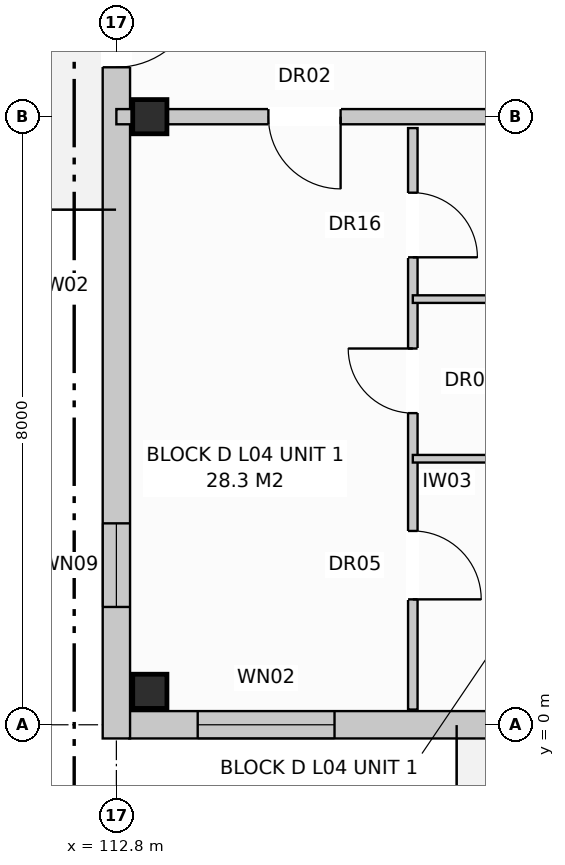
"""IFC4 building model, lengths in metres.
Left out: names, types, materials, properties, quantities, classifications, styles, units other than length and angle.
Written with IfcOpenShell. Run it as: python <this file> out.ifc"""

import sys

from ifc_helpers import new_model, si_unit, direction, frame, frame_2d, origin, origin_with_axes, origin_2d, place, context, subcontext, project, spatial, rectangle, extrude, element, fill, save


model = new_model("IFC4")
c1 = context("Model", 3, precision=1e-05, world=origin(), true_north=direction((0.0, 1.0)))
c2 = subcontext(c1, "Body", "Model", "MODEL_VIEW")
j1 = project(units=[si_unit("LENGTHUNIT", "METRE"), si_unit("PLANEANGLEUNIT", "RADIAN")], contexts=[c1])
p1 = place(None, origin())
s1 = spatial("IfcSite", under=j1, at=p1, CompositionType="ELEMENT")
p2 = place(p1, origin())
s2 = spatial("IfcBuilding", under=s1, at=p2, CompositionType="ELEMENT")
p3 = place(p2, frame((0.0, 0.0, 14.4)))
s3 = spatial("IfcBuildingStorey", under=s2, at=p3, CompositionType="ELEMENT", Elevation=14.4)
for number, where, z_axis, x_axis in (
    (1, (113.24, 0.44, 0.0), (0.0, 0.0, 1.0), (1.0, 0.0, 0.0)),
    (2, (113.24, 8.0, 0.0), (0.0, 0.0, 1.0), (1.0, 0.0, 0.0)),
):
    element("IfcColumn", number, at=place(p3, frame(where, z_axis=z_axis, x_axis=x_axis)), inside=s3, PredefinedType="COLUMN", context=c2, shape_type="SweptSolid", body=[
        extrude(rectangle(XDim=0.45, YDim=0.45, at=origin_2d()), origin(), (0.0, 0.0, 1.0), 3.2),
    ])
p4 = place(p3, frame((112.97, 0.0, 0.0), z_axis=(0.0, 0.0, 1.0), x_axis=(1.0, 0.0, 0.0)))
e3 = element("IfcWall", 3, at=p4, inside=s3, PredefinedType="STANDARD", context=c2, shape_type="SweptSolid", body=[
    extrude(rectangle(XDim=54.86, YDim=0.36, at=frame_2d((27.43, 0.0))), origin(), (0.0, 0.0, 1.0), 2.94),
])
p5 = place(p4, frame((5.127, 0.0, 0.0)))
e4 = element("IfcOpeningElement", 4, at=p5, cuts=e3, PredefinedType="OPENING", context=c2, shape_type="SweptSolid", body=[
    extrude(rectangle(XDim=0.95, YDim=2.1, at=frame_2d((0.475, 1.05))), frame((0.0, 0.192, 0.0), z_axis=(0.0, -1.0, 0.0), x_axis=(1.0, 0.0, 0.0)), (0.0, 0.0, 1.0), 0.384),
])
p6 = place(p4, frame((18.9, 0.0, 0.0)))
e5 = element("IfcOpeningElement", 5, at=p6, cuts=e3, PredefinedType="OPENING", context=c2, shape_type="SweptSolid", body=[
    extrude(rectangle(XDim=0.95, YDim=2.1, at=frame_2d((0.475, 1.05))), frame((0.0, 0.192, 0.0), z_axis=(0.0, -1.0, 0.0), x_axis=(1.0, 0.0, 0.0)), (0.0, 0.0, 1.0), 0.384),
])
p7 = place(p4, frame((32.7, 0.0, 0.0)))
e6 = element("IfcOpeningElement", 6, at=p7, cuts=e3, PredefinedType="OPENING", context=c2, shape_type="SweptSolid", body=[
    extrude(rectangle(XDim=0.95, YDim=2.1, at=frame_2d((0.475, 1.05))), frame((0.0, 0.192, 0.0), z_axis=(0.0, -1.0, 0.0), x_axis=(1.0, 0.0, 0.0)), (0.0, 0.0, 1.0), 0.384),
])
p8 = place(p4, frame((44.591, 0.0, 0.0)))
e7 = element("IfcOpeningElement", 7, at=p8, cuts=e3, PredefinedType="OPENING", context=c2, shape_type="SweptSolid", body=[
    extrude(rectangle(XDim=0.95, YDim=2.1, at=frame_2d((0.475, 1.05))), frame((0.0, 0.192, 0.0), z_axis=(0.0, -1.0, 0.0), x_axis=(1.0, 0.0, 0.0)), (0.0, 0.0, 1.0), 0.384),
])
p9 = place(p4, frame((0.9, 0.0, 0.8)))
e8 = element("IfcOpeningElement", 8, at=p9, cuts=e3, PredefinedType="OPENING", context=c2, shape_type="SweptSolid", body=[
    extrude(rectangle(XDim=1.8, YDim=1.7, at=frame_2d((0.9, 0.85))), frame((0.0, 0.192, 0.0), z_axis=(0.0, -1.0, 0.0), x_axis=(1.0, 0.0, 0.0)), (0.0, 0.0, 1.0), 0.384),
])
p10 = place(p4, frame((8.35, 0.0, 0.72)))
e9 = element("IfcOpeningElement", 9, at=p10, cuts=e3, PredefinedType="OPENING", context=c2, shape_type="SweptSolid", body=[
    extrude(rectangle(XDim=1.1, YDim=1.5, at=frame_2d((0.55, 0.75))), frame((0.0, 0.192, 0.0), z_axis=(0.0, -1.0, 0.0), x_axis=(1.0, 0.0, 0.0)), (0.0, 0.0, 1.0), 0.384),
])
p11 = place(p4, frame((11.225, 0.0, 0.8)))
e10 = element("IfcOpeningElement", 10, at=p11, cuts=e3, PredefinedType="OPENING", context=c2, shape_type="SweptSolid", body=[
    extrude(rectangle(XDim=1.95, YDim=1.65, at=frame_2d((0.975, 0.825))), frame((0.0, 0.192, 0.0), z_axis=(0.0, -1.0, 0.0), x_axis=(1.0, 0.0, 0.0)), (0.0, 0.0, 1.0), 0.384),
])
p12 = place(p4, frame((16.8, 0.0, 0.8)))
e11 = element("IfcOpeningElement", 11, at=p12, cuts=e3, PredefinedType="OPENING", context=c2, shape_type="SweptSolid", body=[
    extrude(rectangle(XDim=1.8, YDim=1.7, at=frame_2d((0.9, 0.85))), frame((0.0, 0.192, 0.0), z_axis=(0.0, -1.0, 0.0), x_axis=(1.0, 0.0, 0.0)), (0.0, 0.0, 1.0), 0.384),
])
p13 = place(p4, frame((22.25, 0.0, 0.72)))
e12 = element("IfcOpeningElement", 12, at=p13, cuts=e3, PredefinedType="OPENING", context=c2, shape_type="SweptSolid", body=[
    extrude(rectangle(XDim=1.9, YDim=1.85, at=frame_2d((0.95, 0.925))), frame((0.0, 0.192, 0.0), z_axis=(0.0, -1.0, 0.0), x_axis=(1.0, 0.0, 0.0)), (0.0, 0.0, 1.0), 0.384),
])
p14 = place(p4, frame((28.35, 0.0, 0.72)))
e13 = element("IfcOpeningElement", 13, at=p14, cuts=e3, PredefinedType="OPENING", context=c2, shape_type="SweptSolid", body=[
    extrude(rectangle(XDim=1.1, YDim=1.5, at=frame_2d((0.55, 0.75))), frame((0.0, 0.192, 0.0), z_axis=(0.0, -1.0, 0.0), x_axis=(1.0, 0.0, 0.0)), (0.0, 0.0, 1.0), 0.384),
])
p15 = place(p4, frame((30.6, 0.0, 0.8)))
e14 = element("IfcOpeningElement", 14, at=p15, cuts=e3, PredefinedType="OPENING", context=c2, shape_type="SweptSolid", body=[
    extrude(rectangle(XDim=1.8, YDim=1.7, at=frame_2d((0.9, 0.85))), frame((0.0, 0.192, 0.0), z_axis=(0.0, -1.0, 0.0), x_axis=(1.0, 0.0, 0.0)), (0.0, 0.0, 1.0), 0.384),
])
p16 = place(p4, frame((36.55, 0.0, 0.8)))
e15 = element("IfcOpeningElement", 15, at=p16, cuts=e3, PredefinedType="OPENING", context=c2, shape_type="SweptSolid", body=[
    extrude(rectangle(XDim=1.9, YDim=1.85, at=frame_2d((0.95, 0.925))), frame((0.0, 0.192, 0.0), z_axis=(0.0, -1.0, 0.0), x_axis=(1.0, 0.0, 0.0)), (0.0, 0.0, 1.0), 0.384),
])
p17 = place(p4, frame((42.65, 0.0, 0.72)))
e16 = element("IfcOpeningElement", 16, at=p17, cuts=e3, PredefinedType="OPENING", context=c2, shape_type="SweptSolid", body=[
    extrude(rectangle(XDim=1.1, YDim=1.5, at=frame_2d((0.55, 0.75))), frame((0.0, 0.192, 0.0), z_axis=(0.0, -1.0, 0.0), x_axis=(1.0, 0.0, 0.0)), (0.0, 0.0, 1.0), 0.384),
])
p18 = place(p4, frame((48.7, 0.0, 0.8)))
e17 = element("IfcOpeningElement", 17, at=p18, cuts=e3, PredefinedType="OPENING", context=c2, shape_type="SweptSolid", body=[
    extrude(rectangle(XDim=1.8, YDim=1.7, at=frame_2d((0.9, 0.85))), frame((0.0, 0.192, 0.0), z_axis=(0.0, -1.0, 0.0), x_axis=(1.0, 0.0, 0.0)), (0.0, 0.0, 1.0), 0.384),
])
p19 = place(p4, frame((52.45, 0.0, 0.72)))
e18 = element("IfcOpeningElement", 18, at=p19, cuts=e3, PredefinedType="OPENING", context=c2, shape_type="SweptSolid", body=[
    extrude(rectangle(XDim=1.1, YDim=1.5, at=frame_2d((0.55, 0.75))), frame((0.0, 0.192, 0.0), z_axis=(0.0, -1.0, 0.0), x_axis=(1.0, 0.0, 0.0)), (0.0, 0.0, 1.0), 0.384),
])
p20 = place(p3, frame((112.8, -0.18, 0.0), z_axis=(0.0, 0.0, 1.0), x_axis=(0.0, 1.0, 0.0)))
e19 = element("IfcWall", 19, at=p20, inside=s3, PredefinedType="STANDARD", context=c2, shape_type="SweptSolid", body=[
    extrude(rectangle(XDim=18.76, YDim=0.36, at=frame_2d((9.38, 0.0))), origin(), (0.0, 0.0, 1.0), 2.94),
])
p21 = place(p20, frame((8.83, 0.0, 0.0)))
e20 = element("IfcOpeningElement", 20, at=p21, cuts=e19, PredefinedType="OPENING", context=c2, shape_type="SweptSolid", body=[
    extrude(rectangle(XDim=1.1, YDim=2.1, at=frame_2d((0.55, 1.05))), frame((0.0, 0.192, 0.0), z_axis=(0.0, -1.0, 0.0), x_axis=(1.0, 0.0, 0.0)), (0.0, 0.0, 1.0), 0.384),
])
p22 = place(p20, frame((1.73, 0.0, 0.72)))
e21 = element("IfcOpeningElement", 21, at=p22, cuts=e19, PredefinedType="OPENING", context=c2, shape_type="SweptSolid", body=[
    extrude(rectangle(XDim=1.1, YDim=1.5, at=frame_2d((0.55, 0.75))), frame((0.0, 0.192, 0.0), z_axis=(0.0, -1.0, 0.0), x_axis=(1.0, 0.0, 0.0)), (0.0, 0.0, 1.0), 0.384),
])
p23 = place(p20, frame((15.93, 0.0, 0.72)))
e22 = element("IfcOpeningElement", 22, at=p23, cuts=e19, PredefinedType="OPENING", context=c2, shape_type="SweptSolid", body=[
    extrude(rectangle(XDim=1.1, YDim=1.5, at=frame_2d((0.55, 0.75))), frame((0.0, 0.192, 0.0), z_axis=(0.0, -1.0, 0.0), x_axis=(1.0, 0.0, 0.0)), (0.0, 0.0, 1.0), 0.384),
])
p24 = place(p3, frame((112.8, 8.0, 0.0), z_axis=(0.0, 0.0, 1.0), x_axis=(1.0, 0.0, 0.0)))
e23 = element("IfcWall", 23, at=p24, inside=s3, PredefinedType="PARTITIONING", context=c2, shape_type="SweptSolid", body=[
    extrude(rectangle(XDim=6.9, YDim=0.2, at=frame_2d((3.45, 0.0))), origin(), (0.0, 0.0, 1.0), 2.38),
])
p25 = place(p24, frame((2.0, 0.0, 0.0)))
e24 = element("IfcOpeningElement", 24, at=p25, cuts=e23, PredefinedType="OPENING", context=c2, shape_type="SweptSolid", body=[
    extrude(rectangle(XDim=0.95, YDim=2.15, at=frame_2d((0.475, 1.075))), frame((0.0, 0.112, 0.0), z_axis=(0.0, -1.0, 0.0), x_axis=(1.0, 0.0, 0.0)), (0.0, 0.0, 1.0), 0.224),
])
p26 = place(p3, frame((116.7, 7.85, 0.0), z_axis=(0.0, 0.0, 1.0), x_axis=(0.0, -1.0, 0.0)))
e25 = element("IfcWall", 25, at=p26, inside=s3, PredefinedType="PARTITIONING", context=c2, shape_type="SweptSolid", body=[
    extrude(rectangle(XDim=7.65, YDim=0.125, at=frame_2d((3.825, 0.0))), origin(), (0.0, 0.0, 1.0), 2.94),
])
p27 = place(p26, frame((0.85, 0.0, 0.0)))
e26 = element("IfcOpeningElement", 26, at=p27, cuts=e25, PredefinedType="OPENING", context=c2, shape_type="SweptSolid", body=[
    extrude(rectangle(XDim=0.85, YDim=2.1, at=frame_2d((0.425, 1.05))), frame((0.0, 0.074, 0.0), z_axis=(0.0, -1.0, 0.0), x_axis=(1.0, 0.0, 0.0)), (0.0, 0.0, 1.0), 0.149),
])
p28 = place(p26, frame((2.9, 0.0, 0.0)))
e27 = element("IfcOpeningElement", 27, at=p28, cuts=e25, PredefinedType="OPENING", context=c2, shape_type="SweptSolid", body=[
    extrude(rectangle(XDim=0.85, YDim=2.05, at=frame_2d((0.425, 1.025))), frame((0.0, 0.074, 0.0), z_axis=(0.0, -1.0, 0.0), x_axis=(1.0, 0.0, 0.0)), (0.0, 0.0, 1.0), 0.149),
])
p29 = place(p26, frame((5.3, 0.0, 0.0)))
e28 = element("IfcOpeningElement", 28, at=p29, cuts=e25, PredefinedType="OPENING", context=c2, shape_type="SweptSolid", body=[
    extrude(rectangle(XDim=0.9, YDim=2.1, at=frame_2d((0.45, 1.05))), frame((0.0, 0.074, 0.0), z_axis=(0.0, -1.0, 0.0), x_axis=(1.0, 0.0, 0.0)), (0.0, 0.0, 1.0), 0.149),
])
for number, where, z_axis, x_axis in (
    (29, (116.7, 5.6, 0.0), (0.0, 0.0, 1.0), (1.0, 0.0, 0.0)),
    (30, (116.7, 3.5, 0.0), (0.0, 0.0, 1.0), (1.0, 0.0, 0.0)),
):
    element("IfcWall", number, at=place(p3, frame(where, z_axis=z_axis, x_axis=x_axis)), inside=s3, PredefinedType="PARTITIONING", context=c2, shape_type="SweptSolid", body=[
        extrude(rectangle(XDim=2.9, YDim=0.1, at=frame_2d((1.45, 0.0))), origin(), (0.0, 0.0, 1.0), 2.94),
    ])
p30 = place(p9, origin_with_axes())
e31 = element("IfcWindow", 31, at=p30, inside=s3, PartitioningType="SINGLE_PANEL", PredefinedType="WINDOW", context=c2, shape_type="SweptSolid", body=[
    extrude(rectangle(XDim=1.8, YDim=1.7, at=frame_2d((0.9, 0.85))), frame((0.0, 0.03, 0.0), z_axis=(0.0, -1.0, 0.0), x_axis=(1.0, 0.0, 0.0)), (0.0, 0.0, 1.0), 0.06),
])
fill(e8, e31)
p31 = place(p21, frame((1.1, 0.0, 0.0), z_axis=(0.0, 0.0, 1.0), x_axis=(-1.0, 0.0, 0.0)))
e32 = element("IfcDoor", 32, at=p31, inside=s3, OperationType="SINGLE_SWING_RIGHT", PredefinedType="DOOR", context=c2, shape_type="SweptSolid", body=[
    extrude(rectangle(XDim=1.1, YDim=2.1, at=frame_2d((0.55, 1.05))), frame((0.0, 0.025, 0.0), z_axis=(0.0, -1.0, 0.0), x_axis=(1.0, 0.0, 0.0)), (0.0, 0.0, 1.0), 0.05),
])
fill(e20, e32)
p32 = place(p22, origin_with_axes())
e33 = element("IfcWindow", 33, at=p32, inside=s3, PartitioningType="SINGLE_PANEL", PredefinedType="WINDOW", context=c2, shape_type="SweptSolid", body=[
    extrude(rectangle(XDim=1.1, YDim=1.5, at=frame_2d((0.55, 0.75))), frame((0.0, 0.03, 0.0), z_axis=(0.0, -1.0, 0.0), x_axis=(1.0, 0.0, 0.0)), (0.0, 0.0, 1.0), 0.06),
])
fill(e21, e33)
p33 = place(p25, frame((0.95, 0.0, 0.0), z_axis=(0.0, 0.0, 1.0), x_axis=(-1.0, 0.0, 0.0)))
e34 = element("IfcDoor", 34, at=p33, inside=s3, OperationType="SINGLE_SWING_RIGHT", PredefinedType="DOOR", context=c2, shape_type="SweptSolid", body=[
    extrude(rectangle(XDim=0.95, YDim=2.15, at=frame_2d((0.475, 1.075))), frame((0.0, 0.025, 0.0), z_axis=(0.0, -1.0, 0.0), x_axis=(1.0, 0.0, 0.0)), (0.0, 0.0, 1.0), 0.05),
])
fill(e24, e34)
p34 = place(p27, origin_with_axes())
e35 = element("IfcDoor", 35, at=p34, inside=s3, OperationType="SINGLE_SWING_RIGHT", PredefinedType="DOOR", context=c2, shape_type="SweptSolid", body=[
    extrude(rectangle(XDim=0.85, YDim=2.1, at=frame_2d((0.425, 1.05))), frame((0.0, 0.025, 0.0), z_axis=(0.0, -1.0, 0.0), x_axis=(1.0, 0.0, 0.0)), (0.0, 0.0, 1.0), 0.05),
])
fill(e26, e35)
p35 = place(p28, frame((0.85, 0.0, 0.0), z_axis=(0.0, 0.0, 1.0), x_axis=(-1.0, 0.0, 0.0)))
e36 = element("IfcDoor", 36, at=p35, inside=s3, OperationType="SINGLE_SWING_LEFT", PredefinedType="DOOR", context=c2, shape_type="SweptSolid", body=[
    extrude(rectangle(XDim=0.85, YDim=2.05, at=frame_2d((0.425, 1.025))), frame((0.0, 0.025, 0.0), z_axis=(0.0, -1.0, 0.0), x_axis=(1.0, 0.0, 0.0)), (0.0, 0.0, 1.0), 0.05),
])
fill(e27, e36)
p36 = place(p29, origin_with_axes())
e37 = element("IfcDoor", 37, at=p36, inside=s3, OperationType="SINGLE_SWING_RIGHT", PredefinedType="DOOR", context=c2, shape_type="SweptSolid", body=[
    extrude(rectangle(XDim=0.9, YDim=2.1, at=frame_2d((0.45, 1.05))), frame((0.0, 0.025, 0.0), z_axis=(0.0, -1.0, 0.0), x_axis=(1.0, 0.0, 0.0)), (0.0, 0.0, 1.0), 0.05),
])
fill(e28, e37)
save(model, sys.argv[1])
